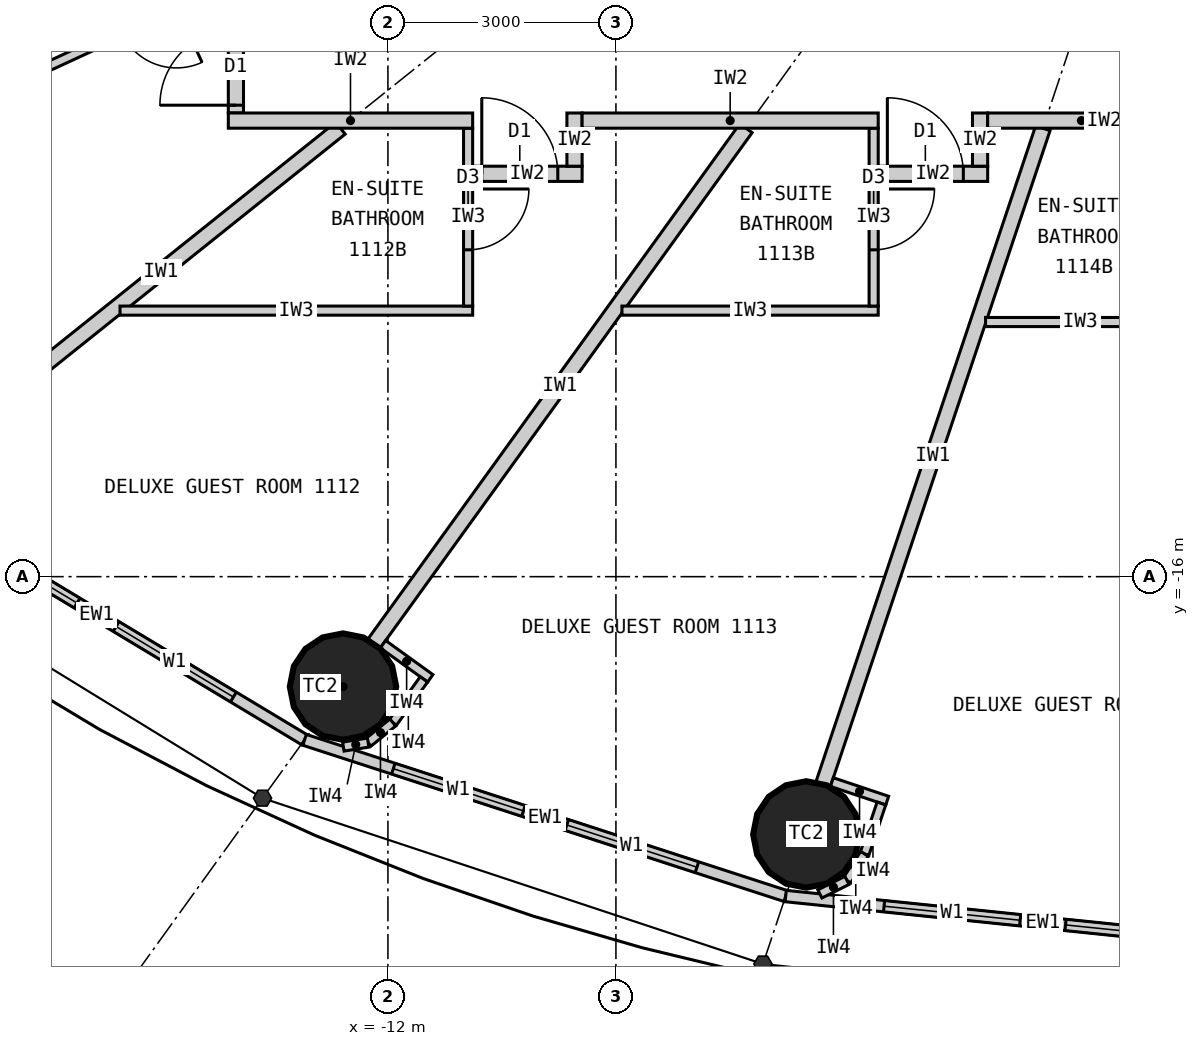
"""IFC4 building model, lengths in metres.
Left out: names, types, materials, properties, quantities, classifications, styles, units other than length and angle.
Written with IfcOpenShell. Run it as: python <this file> out.ifc"""

import sys

from ifc_helpers import new_model, si_unit, direction, frame, frame_2d, origin, origin_2d, place, context, subcontext, project, spatial, rectangle, circle, extrude, element, fill, save


model = new_model("IFC4")
c1 = context("Model", 3, precision=1e-05, world=origin(), true_north=direction((0.0, 1.0)))
c2 = subcontext(c1, "Body", "Model", "MODEL_VIEW")
j1 = project(units=[si_unit("LENGTHUNIT", "METRE"), si_unit("PLANEANGLEUNIT", "RADIAN")], contexts=[c1])
p1 = place(None, origin())
s1 = spatial("IfcSite", under=j1, at=p1, CompositionType="ELEMENT")
p2 = place(p1, origin())
s2 = spatial("IfcBuilding", under=s1, at=p2, CompositionType="ELEMENT")
p3 = place(p2, frame((0.0, 0.0, 50.7)))
s3 = spatial("IfcBuildingStorey", under=s2, at=p3, CompositionType="ELEMENT", Elevation=50.7)
for number, where, z_axis, x_axis in (
    (1, (-12.591, -17.447, 0.0), (0.0, 0.0, 1.0), (1.0, 0.0, 0.0)),
    (2, (-6.495, -19.391, 0.0), (0.0, 0.0, 1.0), (1.0, 0.0, 0.0)),
):
    element("IfcColumn", number, at=place(p3, frame(where, z_axis=z_axis, x_axis=x_axis)), inside=s3, PredefinedType="COLUMN", context=c2, shape_type="SweptSolid", body=[
        extrude(circle(Radius=0.7, at=origin_2d()), origin(), (0.0, 0.0, 1.0), 3.3),
    ])
p4 = place(p3, frame((-18.57, -14.856, 0.0), z_axis=(0.0, 0.0, 1.0), x_axis=(0.856983180864, -0.515344377787, 0.0)))
e3 = element("IfcWall", 3, at=p4, inside=s3, PredefinedType="ELEMENTEDWALL", context=c2, shape_type="SweptSolid", body=[
    extrude(rectangle(XDim=6.386, YDim=0.15, at=frame_2d((3.193, 0.0))), origin(), (0.0, 0.0, 1.0), 3.12),
])
p5 = place(p4, frame((1.093, 0.0, 0.9)))
e4 = element("IfcOpeningElement", 4, at=p5, cuts=e3, PredefinedType="OPENING", context=c2, shape_type="SweptSolid", body=[
    extrude(rectangle(XDim=1.8, YDim=1.9, at=frame_2d((0.9, 0.95))), frame((0.0, 0.085, 0.0), z_axis=(0.0, -1.0, 0.0), x_axis=(1.0, 0.0, 0.0)), (0.0, 0.0, 1.0), 0.17),
])
p6 = place(p4, frame((3.493, 0.0, 0.9)))
e5 = element("IfcOpeningElement", 5, at=p6, cuts=e3, PredefinedType="OPENING", context=c2, shape_type="SweptSolid", body=[
    extrude(rectangle(XDim=1.8, YDim=1.9, at=frame_2d((0.9, 0.95))), frame((0.0, 0.085, 0.0), z_axis=(0.0, -1.0, 0.0), x_axis=(1.0, 0.0, 0.0)), (0.0, 0.0, 1.0), 0.17),
])
p7 = place(p3, frame((-13.096, -18.147, 0.0), z_axis=(0.0, 0.0, 1.0), x_axis=(0.951137534625, -0.308767534285, 0.0)))
e6 = element("IfcWall", 6, at=p7, inside=s3, PredefinedType="ELEMENTEDWALL", context=c2, shape_type="SweptSolid", body=[
    extrude(rectangle(XDim=6.655, YDim=0.15, at=frame_2d((3.328, 0.0))), origin(), (0.0, 0.0, 1.0), 3.12),
])
p8 = place(p7, frame((1.228, 0.0, 0.9)))
e7 = element("IfcOpeningElement", 7, at=p8, cuts=e6, PredefinedType="OPENING", context=c2, shape_type="SweptSolid", body=[
    extrude(rectangle(XDim=1.8, YDim=1.9, at=frame_2d((0.9, 0.95))), frame((0.0, 0.085, 0.0), z_axis=(0.0, -1.0, 0.0), x_axis=(1.0, 0.0, 0.0)), (0.0, 0.0, 1.0), 0.17),
])
p9 = place(p7, frame((3.628, 0.0, 0.9)))
e8 = element("IfcOpeningElement", 8, at=p9, cuts=e6, PredefinedType="OPENING", context=c2, shape_type="SweptSolid", body=[
    extrude(rectangle(XDim=1.8, YDim=1.9, at=frame_2d((0.9, 0.95))), frame((0.0, 0.085, 0.0), z_axis=(0.0, -1.0, 0.0), x_axis=(1.0, 0.0, 0.0)), (0.0, 0.0, 1.0), 0.17),
])
p10 = place(p3, frame((-6.766, -20.202, 0.0), z_axis=(0.0, 0.0, 1.0), x_axis=(0.994721394369, -0.102612609291, 0.0)))
e9 = element("IfcWall", 9, at=p10, inside=s3, PredefinedType="ELEMENTEDWALL", context=c2, shape_type="SweptSolid", body=[
    extrude(rectangle(XDim=6.802, YDim=0.15, at=frame_2d((3.401, 0.0))), origin(), (0.0, 0.0, 1.0), 3.12),
])
p11 = place(p10, frame((1.301, 0.0, 0.9)))
e10 = element("IfcOpeningElement", 10, at=p11, cuts=e9, PredefinedType="OPENING", context=c2, shape_type="SweptSolid", body=[
    extrude(rectangle(XDim=1.8, YDim=1.9, at=frame_2d((0.9, 0.95))), frame((0.0, 0.085, 0.0), z_axis=(0.0, -1.0, 0.0), x_axis=(1.0, 0.0, 0.0)), (0.0, 0.0, 1.0), 0.17),
])
p12 = place(p10, frame((3.701, 0.0, 0.9)))
e11 = element("IfcOpeningElement", 11, at=p12, cuts=e9, PredefinedType="OPENING", context=c2, shape_type="SweptSolid", body=[
    extrude(rectangle(XDim=1.8, YDim=1.9, at=frame_2d((0.9, 0.95))), frame((0.0, 0.085, 0.0), z_axis=(0.0, -1.0, 0.0), x_axis=(1.0, 0.0, 0.0)), (0.0, 0.0, 1.0), 0.17),
])
p13 = place(p3, frame((-14.1, -6.512, 0.0), z_axis=(0.0, 0.0, 1.0), x_axis=(-0.907832871056, -0.419332181247, 0.0)))
e12 = element("IfcWall", 12, at=p13, inside=s3, PredefinedType="PARTITIONING", context=c2, shape_type="SweptSolid", body=[
    extrude(rectangle(XDim=8.023, YDim=0.2, at=frame_2d((4.011, 0.0))), origin(), (0.0, 0.0, 1.0), 2.32),
])
p14 = place(p3, frame((-12.625, -10.1, 0.0), z_axis=(0.0, 0.0, 1.0), x_axis=(-0.780892451574, -0.624665493744, 0.0)))
e13 = element("IfcWall", 13, at=p14, inside=s3, PredefinedType="PARTITIONING", context=c2, shape_type="SweptSolid", body=[
    extrude(rectangle(XDim=6.045, YDim=0.2, at=frame_2d((3.022, 0.0))), origin(), (0.0, 0.0, 1.0), 2.32),
])
p15 = place(p3, frame((-7.289, -10.1, 0.0), z_axis=(0.0, 0.0, 1.0), x_axis=(-0.585198353053, -0.810890182197, 0.0)))
e14 = element("IfcWall", 14, at=p15, inside=s3, PredefinedType="PARTITIONING", context=c2, shape_type="SweptSolid", body=[
    extrude(rectangle(XDim=8.36, YDim=0.2, at=frame_2d((4.18, 0.0))), origin(), (0.0, 0.0, 1.0), 2.32),
])
p16 = place(p3, frame((-3.383, -10.1, 0.0), z_axis=(0.0, 0.0, 1.0), x_axis=(-0.31759592231, -0.948226149256, 0.0)))
e15 = element("IfcWall", 15, at=p16, inside=s3, PredefinedType="PARTITIONING", context=c2, shape_type="SweptSolid", body=[
    extrude(rectangle(XDim=9.098, YDim=0.2, at=frame_2d((4.549, 0.0))), origin(), (0.0, 0.0, 1.0), 2.32),
])
p17 = place(p3, frame((-14.1, -8.193, 0.0), z_axis=(0.0, 0.0, 1.0), x_axis=(-0.907836493557, -0.419324338628, 0.0)))
e16 = element("IfcWall", 16, at=p17, inside=s3, PredefinedType="PARTITIONING", context=c2, shape_type="SweptSolid", body=[
    extrude(rectangle(XDim=3.49, YDim=0.12, at=frame_2d((1.745, 0.0))), origin(), (0.0, 0.0, 1.0), 3.12),
])
p18 = place(p17, frame((0.75, 0.0, 0.0)))
e17 = element("IfcOpeningElement", 17, at=p18, cuts=e16, PredefinedType="OPENING", context=c2, shape_type="SweptSolid", body=[
    extrude(rectangle(XDim=0.8, YDim=2.1, at=frame_2d((0.4, 1.05))), frame((0.0, 0.07, 0.0), z_axis=(0.0, -1.0, 0.0), x_axis=(1.0, 0.0, 0.0)), (0.0, 0.0, 1.0), 0.14),
])
p19 = place(p3, frame((-15.525, -12.5, 0.0), z_axis=(0.0, 0.0, 1.0), x_axis=(1.0, 0.0, 0.0)))
e18 = element("IfcWall", 18, at=p19, inside=s3, PredefinedType="PARTITIONING", context=c2, shape_type="SweptSolid", body=[
    extrude(rectangle(XDim=4.64, YDim=0.12, at=frame_2d((2.32, 0.0))), origin(), (0.0, 0.0, 1.0), 3.12),
])
p20 = place(p3, frame((-10.945, -10.1, 0.0), z_axis=(0.0, 0.0, 1.0), x_axis=(0.0, -1.0, 0.0)))
e19 = element("IfcWall", 19, at=p20, inside=s3, PredefinedType="PARTITIONING", context=c2, shape_type="SweptSolid", body=[
    extrude(rectangle(XDim=2.34, YDim=0.12, at=frame_2d((1.17, 0.0))), origin(), (0.0, 0.0, 1.0), 3.12),
])
p21 = place(p20, frame((0.8, 0.0, 0.0)))
e20 = element("IfcOpeningElement", 20, at=p21, cuts=e19, PredefinedType="OPENING", context=c2, shape_type="SweptSolid", body=[
    extrude(rectangle(XDim=0.8, YDim=2.1, at=frame_2d((0.4, 1.05))), frame((0.0, 0.07, 0.0), z_axis=(0.0, -1.0, 0.0), x_axis=(1.0, 0.0, 0.0)), (0.0, 0.0, 1.0), 0.14),
])
p22 = place(p3, frame((-8.921, -12.5, 0.0), z_axis=(0.0, 0.0, 1.0), x_axis=(1.0, 0.0, 0.0)))
e21 = element("IfcWall", 21, at=p22, inside=s3, PredefinedType="PARTITIONING", context=c2, shape_type="SweptSolid", body=[
    extrude(rectangle(XDim=3.372, YDim=0.12, at=frame_2d((1.686, 0.0))), origin(), (0.0, 0.0, 1.0), 3.12),
])
p23 = place(p3, frame((-5.609, -10.1, 0.0), z_axis=(0.0, 0.0, 1.0), x_axis=(0.0, -1.0, 0.0)))
e22 = element("IfcWall", 22, at=p23, inside=s3, PredefinedType="PARTITIONING", context=c2, shape_type="SweptSolid", body=[
    extrude(rectangle(XDim=2.34, YDim=0.12, at=frame_2d((1.17, 0.0))), origin(), (0.0, 0.0, 1.0), 3.12),
])
p24 = place(p23, frame((0.8, 0.0, 0.0)))
e23 = element("IfcOpeningElement", 23, at=p24, cuts=e22, PredefinedType="OPENING", context=c2, shape_type="SweptSolid", body=[
    extrude(rectangle(XDim=0.8, YDim=2.1, at=frame_2d((0.4, 1.05))), frame((0.0, 0.07, 0.0), z_axis=(0.0, -1.0, 0.0), x_axis=(1.0, 0.0, 0.0)), (0.0, 0.0, 1.0), 0.14),
])
p25 = place(p3, frame((-4.137, -12.65, 0.0), z_axis=(0.0, 0.0, 1.0), x_axis=(1.0, 0.0, 0.0)))
e24 = element("IfcWall", 24, at=p25, inside=s3, PredefinedType="PARTITIONING", context=c2, shape_type="SweptSolid", body=[
    extrude(rectangle(XDim=2.494, YDim=0.12, at=frame_2d((1.247, 0.0))), origin(), (0.0, 0.0, 1.0), 3.12),
])
p26 = place(p3, frame((-9.445, -10.7, 0.0), z_axis=(0.0, 0.0, 1.0), x_axis=(-1.0, 0.0, 0.0)))
e25 = element("IfcWall", 25, at=p26, inside=s3, PredefinedType="PARTITIONING", context=c2, shape_type="SweptSolid", body=[
    extrude(rectangle(XDim=1.44, YDim=0.2, at=frame_2d((0.72, 0.0))), origin(), (0.0, 0.0, 1.0), 3.12),
])
p27 = place(p26, frame((0.32, 0.0, 0.0)))
e26 = element("IfcOpeningElement", 26, at=p27, cuts=e25, PredefinedType="OPENING", context=c2, shape_type="SweptSolid", body=[
    extrude(rectangle(XDim=1.0, YDim=2.2, at=frame_2d((0.5, 1.1))), frame((0.0, 0.11, 0.0), z_axis=(0.0, -1.0, 0.0), x_axis=(1.0, 0.0, 0.0)), (0.0, 0.0, 1.0), 0.22),
])
p28 = place(p3, frame((-9.545, -9.9, 0.0), z_axis=(0.0, 0.0, 1.0), x_axis=(0.0, -1.0, 0.0)))
e27 = element("IfcWall", 27, at=p28, inside=s3, PredefinedType="PARTITIONING", context=c2, shape_type="SweptSolid", body=[
    extrude(rectangle(XDim=0.7, YDim=0.2, at=frame_2d((0.35, 0.0))), origin(), (0.0, 0.0, 1.0), 3.12),
])
p29 = place(p3, frame((-4.109, -10.7, 0.0), z_axis=(0.0, 0.0, 1.0), x_axis=(-1.0, 0.0, 0.0)))
e28 = element("IfcWall", 28, at=p29, inside=s3, PredefinedType="PARTITIONING", context=c2, shape_type="SweptSolid", body=[
    extrude(rectangle(XDim=1.44, YDim=0.2, at=frame_2d((0.72, 0.0))), origin(), (0.0, 0.0, 1.0), 3.12),
])
p30 = place(p29, frame((0.32, 0.0, 0.0)))
e29 = element("IfcOpeningElement", 29, at=p30, cuts=e28, PredefinedType="OPENING", context=c2, shape_type="SweptSolid", body=[
    extrude(rectangle(XDim=1.0, YDim=2.2, at=frame_2d((0.5, 1.1))), frame((0.0, 0.11, 0.0), z_axis=(0.0, -1.0, 0.0), x_axis=(1.0, 0.0, 0.0)), (0.0, 0.0, 1.0), 0.22),
])
p31 = place(p3, frame((-4.209, -9.9, 0.0), z_axis=(0.0, 0.0, 1.0), x_axis=(0.0, -1.0, 0.0)))
e30 = element("IfcWall", 30, at=p31, inside=s3, PredefinedType="PARTITIONING", context=c2, shape_type="SweptSolid", body=[
    extrude(rectangle(XDim=0.7, YDim=0.2, at=frame_2d((0.35, 0.0))), origin(), (0.0, 0.0, 1.0), 3.12),
])
p32 = place(p3, frame((-14.0, -4.772, 0.0), z_axis=(0.0, 0.0, 1.0), x_axis=(0.0, -1.0, 0.0)))
e31 = element("IfcWall", 31, at=p32, inside=s3, PredefinedType="PARTITIONING", context=c2, shape_type="SweptSolid", body=[
    extrude(rectangle(XDim=5.127, YDim=0.2, at=frame_2d((2.564, 0.0))), origin(), (0.0, 0.0, 1.0), 3.12),
])
p33 = place(p32, frame((4.025, 0.0, 0.0)))
e32 = element("IfcOpeningElement", 32, at=p33, cuts=e31, PredefinedType="OPENING", context=c2, shape_type="SweptSolid", body=[
    extrude(rectangle(XDim=1.0, YDim=2.2, at=frame_2d((0.5, 1.1))), frame((0.0, 0.11, 0.0), z_axis=(0.0, -1.0, 0.0), x_axis=(1.0, 0.0, 0.0)), (0.0, 0.0, 1.0), 0.22),
])
p34 = place(p3, frame((-1.643, -10.0, 0.0), z_axis=(0.0, 0.0, 1.0), x_axis=(-1.0, 0.0, 0.0)))
e33 = element("IfcWall", 33, at=p34, inside=s3, PredefinedType="PARTITIONING", context=c2, shape_type="SweptSolid", body=[
    extrude(rectangle(XDim=2.466, YDim=0.2, at=frame_2d((1.233, 0.0))), origin(), (0.0, 0.0, 1.0), 3.12),
])
p35 = place(p3, frame((-5.549, -10.0, 0.0), z_axis=(0.0, 0.0, 1.0), x_axis=(-1.0, 0.0, 0.0)))
e34 = element("IfcWall", 34, at=p35, inside=s3, PredefinedType="PARTITIONING", context=c2, shape_type="SweptSolid", body=[
    extrude(rectangle(XDim=3.896, YDim=0.2, at=frame_2d((1.948, 0.0))), origin(), (0.0, 0.0, 1.0), 3.12),
])
p36 = place(p3, frame((-10.885, -10.0, 0.0), z_axis=(0.0, 0.0, 1.0), x_axis=(-1.0, 0.0, 0.0)))
e35 = element("IfcWall", 35, at=p36, inside=s3, PredefinedType="PARTITIONING", context=c2, shape_type="SweptSolid", body=[
    extrude(rectangle(XDim=3.215, YDim=0.2, at=frame_2d((1.607, 0.0))), origin(), (0.0, 0.0, 1.0), 3.12),
])
p37 = place(p3, frame((-12.065, -16.889, 0.0), z_axis=(0.0, 0.0, 1.0), x_axis=(0.810821798253, -0.585293098778, 0.0)))
e36 = element("IfcWall", 36, at=p37, inside=s3, PredefinedType="PARTITIONING", context=c2, shape_type="SweptSolid", body=[
    extrude(rectangle(XDim=0.768, YDim=0.12, at=frame_2d((0.384, 0.0))), origin(), (0.0, 0.0, 1.0), 3.12),
])
p38 = place(p3, frame((-11.526, -17.351, 0.0), z_axis=(0.0, 0.0, 1.0), x_axis=(-0.585223113993, -0.810872312296, 0.0)))
e37 = element("IfcWall", 37, at=p38, inside=s3, PredefinedType="PARTITIONING", context=c2, shape_type="SweptSolid", body=[
    extrude(rectangle(XDim=0.7, YDim=0.12, at=frame_2d((0.35, 0.0))), origin(), (0.0, 0.0, 1.0), 3.12),
])
p39 = place(p3, frame((-11.936, -17.919, 0.0), z_axis=(0.0, 0.0, 1.0), x_axis=(-0.775023088441, -0.631932917629, 0.0)))
e38 = element("IfcWall", 38, at=p39, inside=s3, PredefinedType="PARTITIONING", context=c2, shape_type="SweptSolid", body=[
    extrude(rectangle(XDim=0.418, YDim=0.12, at=frame_2d((0.209, 0.0))), origin(), (0.0, 0.0, 1.0), 3.12),
])
p40 = place(p3, frame((-12.26, -18.183, 0.0), z_axis=(0.0, 0.0, 1.0), x_axis=(-0.987218661664, -0.159371622511, 0.0)))
e39 = element("IfcWall", 39, at=p40, inside=s3, PredefinedType="PARTITIONING", context=c2, shape_type="SweptSolid", body=[
    extrude(rectangle(XDim=0.331, YDim=0.12, at=frame_2d((0.166, 0.0))), origin(), (0.0, 0.0, 1.0), 3.12),
])
p41 = place(p3, frame((-6.159, -18.702, 0.0), z_axis=(0.0, 0.0, 1.0), x_axis=(0.948173154049, -0.31775410295, 0.0)))
e40 = element("IfcWall", 40, at=p41, inside=s3, PredefinedType="PARTITIONING", context=c2, shape_type="SweptSolid", body=[
    extrude(rectangle(XDim=0.768, YDim=0.12, at=frame_2d((0.384, 0.0))), origin(), (0.0, 0.0, 1.0), 3.12),
])
p42 = place(p3, frame((-5.507, -18.984, 0.0), z_axis=(0.0, 0.0, 1.0), x_axis=(-0.317692050622, -0.948193946918, 0.0)))
e41 = element("IfcWall", 41, at=p42, inside=s3, PredefinedType="PARTITIONING", context=c2, shape_type="SweptSolid", body=[
    extrude(rectangle(XDim=0.7, YDim=0.12, at=frame_2d((0.35, 0.0))), origin(), (0.0, 0.0, 1.0), 3.12),
])
p43 = place(p3, frame((-5.729, -19.648, 0.0), z_axis=(0.0, 0.0, 1.0), x_axis=(-0.552135764955, -0.833754218615, 0.0)))
e42 = element("IfcWall", 42, at=p43, inside=s3, PredefinedType="PARTITIONING", context=c2, shape_type="SweptSolid", body=[
    extrude(rectangle(XDim=0.418, YDim=0.12, at=frame_2d((0.209, 0.0))), origin(), (0.0, 0.0, 1.0), 3.12),
])
p44 = place(p3, frame((-5.96, -19.996, 0.0), z_axis=(0.0, 0.0, 1.0), x_axis=(-0.895160725913, -0.445743507842, 0.0)))
e43 = element("IfcWall", 43, at=p44, inside=s3, PredefinedType="PARTITIONING", context=c2, shape_type="SweptSolid", body=[
    extrude(rectangle(XDim=0.399, YDim=0.12, at=frame_2d((0.199, 0.0))), origin(), (0.0, 0.0, 1.0), 3.12),
])
p45 = place(p5, origin())
e44 = element("IfcWindow", 44, at=p45, inside=s3, PartitioningType="SINGLE_PANEL", PredefinedType="WINDOW", context=c2, shape_type="SweptSolid", body=[
    extrude(rectangle(XDim=1.8, YDim=1.9, at=frame_2d((0.9, 0.95))), frame((0.0, 0.03, 0.0), z_axis=(0.0, -1.0, 0.0), x_axis=(1.0, 0.0, 0.0)), (0.0, 0.0, 1.0), 0.06),
])
fill(e4, e44)
p46 = place(p6, origin())
e45 = element("IfcWindow", 45, at=p46, inside=s3, PartitioningType="SINGLE_PANEL", PredefinedType="WINDOW", context=c2, shape_type="SweptSolid", body=[
    extrude(rectangle(XDim=1.8, YDim=1.9, at=frame_2d((0.9, 0.95))), frame((0.0, 0.03, 0.0), z_axis=(0.0, -1.0, 0.0), x_axis=(1.0, 0.0, 0.0)), (0.0, 0.0, 1.0), 0.06),
])
fill(e5, e45)
p47 = place(p8, origin())
e46 = element("IfcWindow", 46, at=p47, inside=s3, PartitioningType="SINGLE_PANEL", PredefinedType="WINDOW", context=c2, shape_type="SweptSolid", body=[
    extrude(rectangle(XDim=1.8, YDim=1.9, at=frame_2d((0.9, 0.95))), frame((0.0, 0.03, 0.0), z_axis=(0.0, -1.0, 0.0), x_axis=(1.0, 0.0, 0.0)), (0.0, 0.0, 1.0), 0.06),
])
fill(e7, e46)
p48 = place(p9, origin())
e47 = element("IfcWindow", 47, at=p48, inside=s3, PartitioningType="SINGLE_PANEL", PredefinedType="WINDOW", context=c2, shape_type="SweptSolid", body=[
    extrude(rectangle(XDim=1.8, YDim=1.9, at=frame_2d((0.9, 0.95))), frame((0.0, 0.03, 0.0), z_axis=(0.0, -1.0, 0.0), x_axis=(1.0, 0.0, 0.0)), (0.0, 0.0, 1.0), 0.06),
])
fill(e8, e47)
p49 = place(p11, origin())
e48 = element("IfcWindow", 48, at=p49, inside=s3, PartitioningType="SINGLE_PANEL", PredefinedType="WINDOW", context=c2, shape_type="SweptSolid", body=[
    extrude(rectangle(XDim=1.8, YDim=1.9, at=frame_2d((0.9, 0.95))), frame((0.0, 0.03, 0.0), z_axis=(0.0, -1.0, 0.0), x_axis=(1.0, 0.0, 0.0)), (0.0, 0.0, 1.0), 0.06),
])
fill(e10, e48)
p50 = place(p12, origin())
e49 = element("IfcWindow", 49, at=p50, inside=s3, PartitioningType="SINGLE_PANEL", PredefinedType="WINDOW", context=c2, shape_type="SweptSolid", body=[
    extrude(rectangle(XDim=1.8, YDim=1.9, at=frame_2d((0.9, 0.95))), frame((0.0, 0.03, 0.0), z_axis=(0.0, -1.0, 0.0), x_axis=(1.0, 0.0, 0.0)), (0.0, 0.0, 1.0), 0.06),
])
fill(e11, e49)
p51 = place(p33, origin())
e50 = element("IfcDoor", 50, at=p51, inside=s3, OperationType="SINGLE_SWING_RIGHT", PredefinedType="DOOR", context=c2, shape_type="SweptSolid", body=[
    extrude(rectangle(XDim=1.0, YDim=2.2, at=frame_2d((0.5, 1.1))), frame((0.0, 0.025, 0.0), z_axis=(0.0, -1.0, 0.0), x_axis=(1.0, 0.0, 0.0)), (0.0, 0.0, 1.0), 0.05),
])
fill(e32, e50)
p52 = place(p21, origin())
e51 = element("IfcDoor", 51, at=p52, inside=s3, OperationType="SINGLE_SWING_LEFT", PredefinedType="DOOR", context=c2, shape_type="SweptSolid", body=[
    extrude(rectangle(XDim=0.8, YDim=2.1, at=frame_2d((0.4, 1.05))), frame((0.0, 0.025, 0.0), z_axis=(0.0, -1.0, 0.0), x_axis=(1.0, 0.0, 0.0)), (0.0, 0.0, 1.0), 0.05),
])
fill(e20, e51)
p53 = place(p27, origin())
e52 = element("IfcDoor", 52, at=p53, inside=s3, OperationType="SINGLE_SWING_RIGHT", PredefinedType="DOOR", context=c2, shape_type="SweptSolid", body=[
    extrude(rectangle(XDim=1.0, YDim=2.2, at=frame_2d((0.5, 1.1))), frame((0.0, 0.025, 0.0), z_axis=(0.0, -1.0, 0.0), x_axis=(1.0, 0.0, 0.0)), (0.0, 0.0, 1.0), 0.05),
])
fill(e26, e52)
p54 = place(p24, origin())
e53 = element("IfcDoor", 53, at=p54, inside=s3, OperationType="SINGLE_SWING_LEFT", PredefinedType="DOOR", context=c2, shape_type="SweptSolid", body=[
    extrude(rectangle(XDim=0.8, YDim=2.1, at=frame_2d((0.4, 1.05))), frame((0.0, 0.025, 0.0), z_axis=(0.0, -1.0, 0.0), x_axis=(1.0, 0.0, 0.0)), (0.0, 0.0, 1.0), 0.05),
])
fill(e23, e53)
p55 = place(p30, origin())
e54 = element("IfcDoor", 54, at=p55, inside=s3, OperationType="SINGLE_SWING_RIGHT", PredefinedType="DOOR", context=c2, shape_type="SweptSolid", body=[
    extrude(rectangle(XDim=1.0, YDim=2.2, at=frame_2d((0.5, 1.1))), frame((0.0, 0.025, 0.0), z_axis=(0.0, -1.0, 0.0), x_axis=(1.0, 0.0, 0.0)), (0.0, 0.0, 1.0), 0.05),
])
fill(e29, e54)
save(model, sys.argv[1])
